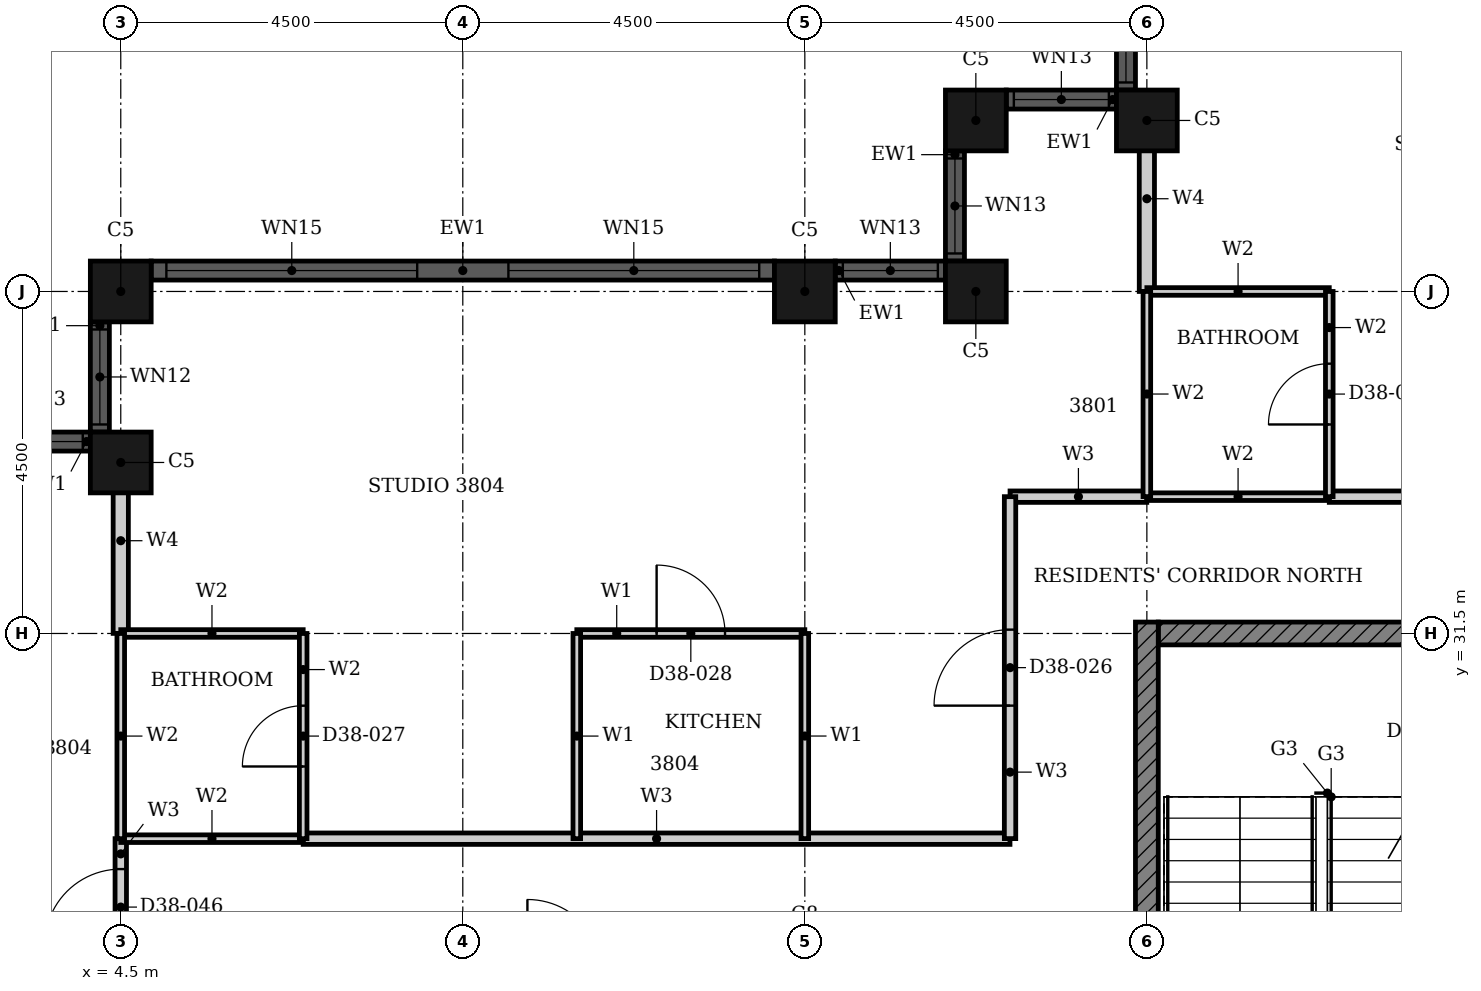
"""IFC4 building model, lengths in metres.
Left out: names, types, materials, properties, quantities, classifications, styles, units other than length and angle.
Written with IfcOpenShell. Run it as: python <this file> out.ifc"""

import sys

from ifc_helpers import new_model, si_unit, direction, frame, frame_2d, origin, origin_2d, place, context, subcontext, project, spatial, rectangle, hollow_rectangle, extrude, element, fill, save


model = new_model("IFC4")
c1 = context("Model", 3, precision=1e-05, world=origin(), true_north=direction((0.0, 1.0)))
c2 = subcontext(c1, "Body", "Model", "MODEL_VIEW")
j1 = project(units=[si_unit("LENGTHUNIT", "METRE"), si_unit("PLANEANGLEUNIT", "RADIAN")], contexts=[c1])
p1 = place(None, origin())
s1 = spatial("IfcSite", under=j1, at=p1, CompositionType="ELEMENT")
p2 = place(p1, origin())
s2 = spatial("IfcBuilding", under=s1, at=p2, CompositionType="ELEMENT")
p3 = place(p2, frame((0.0, 0.0, 154.3)))
s3 = spatial("IfcBuildingStorey", under=s2, at=p3, CompositionType="ELEMENT", Elevation=154.3)
for number, where, z_axis, x_axis in (
    (1, (18.0, 38.25, 0.0), (0.0, 0.0, 1.0), (1.0, 0.0, 0.0)),
    (2, (15.75, 38.25, 0.0), (0.0, 0.0, 1.0), (1.0, 0.0, 0.0)),
    (3, (15.75, 36.0, 0.0), (0.0, 0.0, 1.0), (1.0, 0.0, 0.0)),
    (4, (13.5, 36.0, 0.0), (0.0, 0.0, 1.0), (1.0, 0.0, 0.0)),
    (5, (4.5, 36.0, 0.0), (0.0, 0.0, 1.0), (1.0, 0.0, 0.0)),
    (6, (4.5, 33.75, 0.0), (0.0, 0.0, 1.0), (1.0, 0.0, 0.0)),
):
    element("IfcColumn", number, at=place(p3, frame(where, z_axis=z_axis, x_axis=x_axis)), inside=s3, PredefinedType="COLUMN", context=c2, shape_type="SweptSolid", body=[
        extrude(hollow_rectangle(XDim=0.8, YDim=0.8, WallThickness=0.025, at=origin_2d()), origin(), (0.0, 0.0, 1.0), 3.7),
    ])
p4 = place(p3, frame((17.725, 40.1, 0.0), z_axis=(0.0, 0.0, 1.0), x_axis=(0.0, -1.0, 0.0)))
e7 = element("IfcWall", 7, at=p4, inside=s3, PredefinedType="SOLIDWALL", context=c2, shape_type="SweptSolid", body=[
    extrude(rectangle(XDim=1.45, YDim=0.25, at=frame_2d((0.725, 0.0))), origin(), (0.0, 0.0, 1.0), 3.7),
])
p5 = place(p4, frame((0.1, 0.0, 0.9)))
e8 = element("IfcOpeningElement", 8, at=p5, cuts=e7, PredefinedType="OPENING", context=c2, shape_type="SweptSolid", body=[
    extrude(rectangle(XDim=1.25, YDim=1.85, at=frame_2d((0.625, 0.925))), frame((0.0, 0.135, 0.0), z_axis=(0.0, -1.0, 0.0), x_axis=(1.0, 0.0, 0.0)), (0.0, 0.0, 1.0), 0.27),
])
p6 = place(p3, frame((17.6, 38.525, 0.0), z_axis=(0.0, 0.0, 1.0), x_axis=(-1.0, 0.0, 0.0)))
e9 = element("IfcWall", 9, at=p6, inside=s3, PredefinedType="SOLIDWALL", context=c2, shape_type="SweptSolid", body=[
    extrude(rectangle(XDim=1.45, YDim=0.25, at=frame_2d((0.725, 0.0))), origin(), (0.0, 0.0, 1.0), 3.7),
])
p7 = place(p6, frame((0.1, 0.0, 0.9)))
e10 = element("IfcOpeningElement", 10, at=p7, cuts=e9, PredefinedType="OPENING", context=c2, shape_type="SweptSolid", body=[
    extrude(rectangle(XDim=1.25, YDim=1.85, at=frame_2d((0.625, 0.925))), frame((0.0, 0.135, 0.0), z_axis=(0.0, -1.0, 0.0), x_axis=(1.0, 0.0, 0.0)), (0.0, 0.0, 1.0), 0.27),
])
p8 = place(p3, frame((15.475, 37.85, 0.0), z_axis=(0.0, 0.0, 1.0), x_axis=(0.0, -1.0, 0.0)))
e11 = element("IfcWall", 11, at=p8, inside=s3, PredefinedType="SOLIDWALL", context=c2, shape_type="SweptSolid", body=[
    extrude(rectangle(XDim=1.45, YDim=0.25, at=frame_2d((0.725, 0.0))), origin(), (0.0, 0.0, 1.0), 3.7),
])
p9 = place(p8, frame((0.1, 0.0, 0.9)))
e12 = element("IfcOpeningElement", 12, at=p9, cuts=e11, PredefinedType="OPENING", context=c2, shape_type="SweptSolid", body=[
    extrude(rectangle(XDim=1.25, YDim=1.85, at=frame_2d((0.625, 0.925))), frame((0.0, 0.135, 0.0), z_axis=(0.0, -1.0, 0.0), x_axis=(1.0, 0.0, 0.0)), (0.0, 0.0, 1.0), 0.27),
])
p10 = place(p3, frame((15.35, 36.275, 0.0), z_axis=(0.0, 0.0, 1.0), x_axis=(-1.0, 0.0, 0.0)))
e13 = element("IfcWall", 13, at=p10, inside=s3, PredefinedType="SOLIDWALL", context=c2, shape_type="SweptSolid", body=[
    extrude(rectangle(XDim=1.45, YDim=0.25, at=frame_2d((0.725, 0.0))), origin(), (0.0, 0.0, 1.0), 3.7),
])
p11 = place(p10, frame((0.1, 0.0, 0.9)))
e14 = element("IfcOpeningElement", 14, at=p11, cuts=e13, PredefinedType="OPENING", context=c2, shape_type="SweptSolid", body=[
    extrude(rectangle(XDim=1.25, YDim=1.85, at=frame_2d((0.625, 0.925))), frame((0.0, 0.135, 0.0), z_axis=(0.0, -1.0, 0.0), x_axis=(1.0, 0.0, 0.0)), (0.0, 0.0, 1.0), 0.27),
])
p12 = place(p3, frame((13.1, 36.275, 0.0), z_axis=(0.0, 0.0, 1.0), x_axis=(-1.0, 0.0, 0.0)))
e15 = element("IfcWall", 15, at=p12, inside=s3, PredefinedType="SOLIDWALL", context=c2, shape_type="SweptSolid", body=[
    extrude(rectangle(XDim=8.2, YDim=0.25, at=frame_2d((4.1, 0.0))), origin(), (0.0, 0.0, 1.0), 3.7),
])
p13 = place(p12, frame((0.2, 0.0, 0.45)))
e16 = element("IfcOpeningElement", 16, at=p13, cuts=e15, PredefinedType="OPENING", context=c2, shape_type="SweptSolid", body=[
    extrude(rectangle(XDim=3.3, YDim=2.3, at=frame_2d((1.65, 1.15))), frame((0.0, 0.135, 0.0), z_axis=(0.0, -1.0, 0.0), x_axis=(1.0, 0.0, 0.0)), (0.0, 0.0, 1.0), 0.27),
])
p14 = place(p12, frame((4.7, 0.0, 0.45)))
e17 = element("IfcOpeningElement", 17, at=p14, cuts=e15, PredefinedType="OPENING", context=c2, shape_type="SweptSolid", body=[
    extrude(rectangle(XDim=3.3, YDim=2.3, at=frame_2d((1.65, 1.15))), frame((0.0, 0.135, 0.0), z_axis=(0.0, -1.0, 0.0), x_axis=(1.0, 0.0, 0.0)), (0.0, 0.0, 1.0), 0.27),
])
p15 = place(p3, frame((4.225, 35.6, 0.0), z_axis=(0.0, 0.0, 1.0), x_axis=(0.0, -1.0, 0.0)))
e18 = element("IfcWall", 18, at=p15, inside=s3, PredefinedType="SOLIDWALL", context=c2, shape_type="SweptSolid", body=[
    extrude(rectangle(XDim=1.45, YDim=0.25, at=frame_2d((0.725, 0.0))), origin(), (0.0, 0.0, 1.0), 3.7),
])
p16 = place(p15, frame((0.1, 0.0, 0.9)))
e19 = element("IfcOpeningElement", 19, at=p16, cuts=e18, PredefinedType="OPENING", context=c2, shape_type="SweptSolid", body=[
    extrude(rectangle(XDim=1.25, YDim=2.08, at=frame_2d((0.625, 1.04))), frame((0.0, 0.135, 0.0), z_axis=(0.0, -1.0, 0.0), x_axis=(1.0, 0.0, 0.0)), (0.0, 0.0, 1.0), 0.27),
])
p17 = place(p3, frame((4.1, 34.025, 0.0), z_axis=(0.0, 0.0, 1.0), x_axis=(-1.0, 0.0, 0.0)))
e20 = element("IfcWall", 20, at=p17, inside=s3, PredefinedType="SOLIDWALL", context=c2, shape_type="SweptSolid", body=[
    extrude(rectangle(XDim=1.45, YDim=0.25, at=frame_2d((0.725, 0.0))), origin(), (0.0, 0.0, 1.0), 3.7),
])
p18 = place(p17, frame((0.1, 0.0, 0.9)))
e21 = element("IfcOpeningElement", 21, at=p18, cuts=e20, PredefinedType="OPENING", context=c2, shape_type="SweptSolid", body=[
    extrude(rectangle(XDim=1.25, YDim=1.85, at=frame_2d((0.625, 0.925))), frame((0.0, 0.135, 0.0), z_axis=(0.0, -1.0, 0.0), x_axis=(1.0, 0.0, 0.0)), (0.0, 0.0, 1.0), 0.27),
])
p19 = place(p3, frame((18.15, 31.5, 0.0), z_axis=(0.0, 0.0, 1.0), x_axis=(1.0, 0.0, 0.0)))
e22 = element("IfcWall", 22, at=p19, inside=s3, PredefinedType="SHEAR", context=c2, shape_type="SweptSolid", body=[
    extrude(rectangle(XDim=9.368, YDim=0.3, at=frame_2d((4.684, 0.0))), origin(), (0.0, 0.0, 1.0), 3.4),
])
p20 = place(p19, frame((4.736, 0.0, 0.0)))
e23 = element("IfcOpeningElement", 23, at=p20, cuts=e22, PredefinedType="OPENING", context=c2, shape_type="SweptSolid", body=[
    extrude(rectangle(XDim=1.8, YDim=2.1, at=frame_2d((0.9, 1.05))), frame((0.0, 0.16, 0.0), z_axis=(0.0, -1.0, 0.0), x_axis=(1.0, 0.0, 0.0)), (0.0, 0.0, 1.0), 0.32),
])
p21 = place(p3, frame((18.0, 22.35, 0.0), z_axis=(0.0, 0.0, 1.0), x_axis=(0.0, 1.0, 0.0)))
e24 = element("IfcWall", 24, at=p21, inside=s3, PredefinedType="SHEAR", context=c2, shape_type="SweptSolid", body=[
    extrude(rectangle(XDim=9.3, YDim=0.3, at=frame_2d((4.65, 0.0))), origin(), (0.0, 0.0, 1.0), 3.4),
])
p22 = place(p3, frame((6.9, 28.8, 0.0), z_axis=(0.0, 0.0, 1.0), x_axis=(1.0, 0.0, 0.0)))
e25 = element("IfcWall", 25, at=p22, inside=s3, PredefinedType="PARTITIONING", context=c2, shape_type="SweptSolid", body=[
    extrude(rectangle(XDim=9.299, YDim=0.15, at=frame_2d((4.649, 0.0))), origin(), (0.0, 0.0, 1.0), 3.4),
])
p23 = place(p3, frame((20.4, 33.3, 0.0), z_axis=(0.0, 0.0, 1.0), x_axis=(1.0, 0.0, 0.0)))
e26 = element("IfcWall", 26, at=p23, inside=s3, PredefinedType="PARTITIONING", context=c2, shape_type="SweptSolid", body=[
    extrude(rectangle(XDim=6.6, YDim=0.15, at=frame_2d((3.3, 0.0))), origin(), (0.0, 0.0, 1.0), 3.4),
])
p24 = place(p23, frame((1.3, 0.0, 0.0)))
e27 = element("IfcOpeningElement", 27, at=p24, cuts=e26, PredefinedType="OPENING", context=c2, shape_type="SweptSolid", body=[
    extrude(rectangle(XDim=1.0, YDim=2.2, at=frame_2d((0.5, 1.1))), frame((0.0, 0.085, 0.0), z_axis=(0.0, -1.0, 0.0), x_axis=(1.0, 0.0, 0.0)), (0.0, 0.0, 1.0), 0.17),
])
p25 = place(p3, frame((16.2, 33.3, 0.0), z_axis=(0.0, 0.0, 1.0), x_axis=(1.0, 0.0, 0.0)))
e28 = element("IfcWall", 28, at=p25, inside=s3, PredefinedType="PARTITIONING", context=c2, shape_type="SweptSolid", body=[
    extrude(rectangle(XDim=1.799, YDim=0.15, at=frame_2d((0.899, 0.0))), origin(), (0.0, 0.0, 1.0), 3.4),
])
p26 = place(p3, frame((16.2, 28.801, 0.0), z_axis=(0.0, 0.0, 1.0), x_axis=(0.0, 1.0, 0.0)))
e29 = element("IfcWall", 29, at=p26, inside=s3, PredefinedType="PARTITIONING", context=c2, shape_type="SweptSolid", body=[
    extrude(rectangle(XDim=4.499, YDim=0.15, at=frame_2d((2.25, 0.0))), origin(), (0.0, 0.0, 1.0), 3.4),
])
p27 = place(p26, frame((1.75, 0.0, 0.0)))
e30 = element("IfcOpeningElement", 30, at=p27, cuts=e29, PredefinedType="OPENING", context=c2, shape_type="SweptSolid", body=[
    extrude(rectangle(XDim=1.0, YDim=2.2, at=frame_2d((0.5, 1.1))), frame((0.0, 0.085, 0.0), z_axis=(0.0, -1.0, 0.0), x_axis=(1.0, 0.0, 0.0)), (0.0, 0.0, 1.0), 0.17),
])
p28 = place(p3, frame((4.5, 27.0, 0.0), z_axis=(0.0, 0.0, 1.0), x_axis=(0.0, 1.0, 0.0)))
e31 = element("IfcWall", 31, at=p28, inside=s3, PredefinedType="PARTITIONING", context=c2, shape_type="SweptSolid", body=[
    extrude(rectangle(XDim=1.8, YDim=0.15, at=frame_2d((0.9, 0.0))), origin(), (0.0, 0.0, 1.0), 3.4),
])
p29 = place(p28, frame((0.4, 0.0, 0.0)))
e32 = element("IfcOpeningElement", 32, at=p29, cuts=e31, PredefinedType="OPENING", context=c2, shape_type="SweptSolid", body=[
    extrude(rectangle(XDim=1.0, YDim=2.2, at=frame_2d((0.5, 1.1))), frame((0.0, 0.085, 0.0), z_axis=(0.0, -1.0, 0.0), x_axis=(1.0, 0.0, 0.0)), (0.0, 0.0, 1.0), 0.17),
])
p30 = place(p3, frame((10.5, 31.5, 0.0), z_axis=(0.0, 0.0, 1.0), x_axis=(1.0, 0.0, 0.0)))
e33 = element("IfcWall", 33, at=p30, inside=s3, PredefinedType="PARTITIONING", context=c2, shape_type="SweptSolid", body=[
    extrude(rectangle(XDim=3.0, YDim=0.1, at=frame_2d((1.5, 0.0))), origin(), (0.0, 0.0, 1.0), 2.68),
])
p31 = place(p30, frame((1.05, 0.0, 0.0)))
e34 = element("IfcOpeningElement", 34, at=p31, cuts=e33, PredefinedType="OPENING", context=c2, shape_type="SweptSolid", body=[
    extrude(rectangle(XDim=0.9, YDim=2.1, at=frame_2d((0.45, 1.05))), frame((0.0, 0.06, 0.0), z_axis=(0.0, -1.0, 0.0), x_axis=(1.0, 0.0, 0.0)), (0.0, 0.0, 1.0), 0.12),
])
p32 = place(p3, frame((10.5, 28.8, 0.0), z_axis=(0.0, 0.0, 1.0), x_axis=(0.0, 1.0, 0.0)))
e35 = element("IfcWall", 35, at=p32, inside=s3, PredefinedType="PARTITIONING", context=c2, shape_type="SweptSolid", body=[
    extrude(rectangle(XDim=2.7, YDim=0.1, at=frame_2d((1.35, 0.0))), origin(), (0.0, 0.0, 1.0), 3.4),
])
p33 = place(p3, frame((13.5, 28.801, 0.0), z_axis=(0.0, 0.0, 1.0), x_axis=(0.0, 1.0, 0.0)))
e36 = element("IfcWall", 36, at=p33, inside=s3, PredefinedType="PARTITIONING", context=c2, shape_type="SweptSolid", body=[
    extrude(rectangle(XDim=2.699, YDim=0.1, at=frame_2d((1.35, 0.0))), origin(), (0.0, 0.0, 1.0), 2.48),
])
p34 = place(p3, frame((18.0, 36.0, 0.0), z_axis=(0.0, 0.0, 1.0), x_axis=(0.0, 1.0, 0.0)))
e37 = element("IfcWall", 37, at=p34, inside=s3, PredefinedType="PARTITIONING", context=c2, shape_type="SweptSolid", body=[
    extrude(rectangle(XDim=2.44, YDim=0.2, at=frame_2d((1.22, 0.0))), origin(), (0.0, 0.0, 1.0), 3.4),
])
p35 = place(p3, frame((4.5, 31.501, 0.0), z_axis=(0.0, 0.0, 1.0), x_axis=(0.0, 1.0, 0.0)))
e38 = element("IfcWall", 38, at=p35, inside=s3, PredefinedType="PARTITIONING", context=c2, shape_type="SweptSolid", body=[
    extrude(rectangle(XDim=2.439, YDim=0.2, at=frame_2d((1.219, 0.0))), origin(), (0.0, 0.0, 1.0), 3.4),
])
p36 = place(p3, frame((4.5, 28.8, 0.0), z_axis=(0.0, 0.0, 1.0), x_axis=(1.0, 0.0, 0.0)))
e39 = element("IfcWall", 39, at=p36, inside=s3, PredefinedType="PARTITIONING", context=c2, shape_type="SweptSolid", body=[
    extrude(rectangle(XDim=2.4, YDim=0.1, at=frame_2d((1.2, 0.0))), origin(), (0.0, 0.0, 1.0), 3.4),
])
p37 = place(p3, frame((4.5, 31.5, 0.0), z_axis=(0.0, 0.0, 1.0), x_axis=(1.0, 0.0, 0.0)))
e40 = element("IfcWall", 40, at=p37, inside=s3, PredefinedType="PARTITIONING", context=c2, shape_type="SweptSolid", body=[
    extrude(rectangle(XDim=2.4, YDim=0.1, at=frame_2d((1.2, 0.0))), origin(), (0.0, 0.0, 1.0), 2.68),
])
for number, where, z_axis, x_axis in (
    (41, (18.0, 33.3, 0.0), (0.0, 0.0, 1.0), (1.0, 0.0, 0.0)),
    (42, (18.0, 36.0, 0.0), (0.0, 0.0, 1.0), (1.0, 0.0, 0.0)),
):
    element("IfcWall", number, at=place(p3, frame(where, z_axis=z_axis, x_axis=x_axis)), inside=s3, PredefinedType="PARTITIONING", context=c2, shape_type="SweptSolid", body=[
        extrude(rectangle(XDim=2.4, YDim=0.1, at=frame_2d((1.2, 0.0))), origin(), (0.0, 0.0, 1.0), 3.4),
    ])
p38 = place(p3, frame((18.0, 33.301, 0.0), z_axis=(0.0, 0.0, 1.0), x_axis=(0.0, 1.0, 0.0)))
e43 = element("IfcWall", 43, at=p38, inside=s3, PredefinedType="PARTITIONING", context=c2, shape_type="SweptSolid", body=[
    extrude(rectangle(XDim=2.699, YDim=0.1, at=frame_2d((1.35, 0.0))), origin(), (0.0, 0.0, 1.0), 3.4),
])
p39 = place(p3, frame((20.4, 33.3, 0.0), z_axis=(0.0, 0.0, 1.0), x_axis=(0.0, 1.0, 0.0)))
e44 = element("IfcWall", 44, at=p39, inside=s3, PredefinedType="PARTITIONING", context=c2, shape_type="SweptSolid", body=[
    extrude(rectangle(XDim=2.7, YDim=0.1, at=frame_2d((1.35, 0.0))), origin(), (0.0, 0.0, 1.0), 3.4),
])
p40 = place(p39, frame((0.95, 0.0, 0.0)))
e45 = element("IfcOpeningElement", 45, at=p40, cuts=e44, PredefinedType="OPENING", context=c2, shape_type="SweptSolid", body=[
    extrude(rectangle(XDim=0.8, YDim=2.1, at=frame_2d((0.4, 1.05))), frame((0.0, 0.06, 0.0), z_axis=(0.0, -1.0, 0.0), x_axis=(1.0, 0.0, 0.0)), (0.0, 0.0, 1.0), 0.12),
])
p41 = place(p3, frame((4.5, 28.8, 0.0), z_axis=(0.0, 0.0, 1.0), x_axis=(0.0, 1.0, 0.0)))
e46 = element("IfcWall", 46, at=p41, inside=s3, PredefinedType="PARTITIONING", context=c2, shape_type="SweptSolid", body=[
    extrude(rectangle(XDim=2.7, YDim=0.1, at=frame_2d((1.35, 0.0))), origin(), (0.0, 0.0, 1.0), 3.4),
])
p42 = place(p3, frame((6.9, 28.8, 0.0), z_axis=(0.0, 0.0, 1.0), x_axis=(0.0, 1.0, 0.0)))
e47 = element("IfcWall", 47, at=p42, inside=s3, PredefinedType="PARTITIONING", context=c2, shape_type="SweptSolid", body=[
    extrude(rectangle(XDim=2.7, YDim=0.1, at=frame_2d((1.35, 0.0))), origin(), (0.0, 0.0, 1.0), 3.4),
])
p43 = place(p42, frame((0.95, 0.0, 0.0)))
e48 = element("IfcOpeningElement", 48, at=p43, cuts=e47, PredefinedType="OPENING", context=c2, shape_type="SweptSolid", body=[
    extrude(rectangle(XDim=0.8, YDim=2.1, at=frame_2d((0.4, 1.05))), frame((0.0, 0.06, 0.0), z_axis=(0.0, -1.0, 0.0), x_axis=(1.0, 0.0, 0.0)), (0.0, 0.0, 1.0), 0.12),
])
p44 = place(p5, origin())
e49 = element("IfcWindow", 49, at=p44, inside=s3, PartitioningType="SINGLE_PANEL", PredefinedType="WINDOW", context=c2, shape_type="SweptSolid", body=[
    extrude(rectangle(XDim=1.25, YDim=1.85, at=frame_2d((0.625, 0.925))), frame((0.0, 0.03, 0.0), z_axis=(0.0, -1.0, 0.0), x_axis=(1.0, 0.0, 0.0)), (0.0, 0.0, 1.0), 0.06),
])
fill(e8, e49)
p45 = place(p7, origin())
e50 = element("IfcWindow", 50, at=p45, inside=s3, PartitioningType="SINGLE_PANEL", PredefinedType="WINDOW", context=c2, shape_type="SweptSolid", body=[
    extrude(rectangle(XDim=1.25, YDim=1.85, at=frame_2d((0.625, 0.925))), frame((0.0, 0.03, 0.0), z_axis=(0.0, -1.0, 0.0), x_axis=(1.0, 0.0, 0.0)), (0.0, 0.0, 1.0), 0.06),
])
fill(e10, e50)
p46 = place(p9, origin())
e51 = element("IfcWindow", 51, at=p46, inside=s3, PartitioningType="SINGLE_PANEL", PredefinedType="WINDOW", context=c2, shape_type="SweptSolid", body=[
    extrude(rectangle(XDim=1.25, YDim=1.85, at=frame_2d((0.625, 0.925))), frame((0.0, 0.03, 0.0), z_axis=(0.0, -1.0, 0.0), x_axis=(1.0, 0.0, 0.0)), (0.0, 0.0, 1.0), 0.06),
])
fill(e12, e51)
p47 = place(p11, origin())
e52 = element("IfcWindow", 52, at=p47, inside=s3, PartitioningType="SINGLE_PANEL", PredefinedType="WINDOW", context=c2, shape_type="SweptSolid", body=[
    extrude(rectangle(XDim=1.25, YDim=1.85, at=frame_2d((0.625, 0.925))), frame((0.0, 0.03, 0.0), z_axis=(0.0, -1.0, 0.0), x_axis=(1.0, 0.0, 0.0)), (0.0, 0.0, 1.0), 0.06),
])
fill(e14, e52)
p48 = place(p13, origin())
e53 = element("IfcWindow", 53, at=p48, inside=s3, PartitioningType="SINGLE_PANEL", PredefinedType="WINDOW", context=c2, shape_type="SweptSolid", body=[
    extrude(rectangle(XDim=3.3, YDim=2.3, at=frame_2d((1.65, 1.15))), frame((0.0, 0.03, 0.0), z_axis=(0.0, -1.0, 0.0), x_axis=(1.0, 0.0, 0.0)), (0.0, 0.0, 1.0), 0.06),
])
fill(e16, e53)
p49 = place(p14, origin())
e54 = element("IfcWindow", 54, at=p49, inside=s3, PartitioningType="SINGLE_PANEL", PredefinedType="WINDOW", context=c2, shape_type="SweptSolid", body=[
    extrude(rectangle(XDim=3.3, YDim=2.3, at=frame_2d((1.65, 1.15))), frame((0.0, 0.03, 0.0), z_axis=(0.0, -1.0, 0.0), x_axis=(1.0, 0.0, 0.0)), (0.0, 0.0, 1.0), 0.06),
])
fill(e17, e54)
p50 = place(p16, origin())
e55 = element("IfcWindow", 55, at=p50, inside=s3, PartitioningType="SINGLE_PANEL", PredefinedType="WINDOW", context=c2, shape_type="SweptSolid", body=[
    extrude(rectangle(XDim=1.25, YDim=2.08, at=frame_2d((0.625, 1.04))), frame((0.0, 0.03, 0.0), z_axis=(0.0, -1.0, 0.0), x_axis=(1.0, 0.0, 0.0)), (0.0, 0.0, 1.0), 0.06),
])
fill(e19, e55)
p51 = place(p18, origin())
e56 = element("IfcWindow", 56, at=p51, inside=s3, PartitioningType="SINGLE_PANEL", PredefinedType="WINDOW", context=c2, shape_type="SweptSolid", body=[
    extrude(rectangle(XDim=1.25, YDim=1.85, at=frame_2d((0.625, 0.925))), frame((0.0, 0.03, 0.0), z_axis=(0.0, -1.0, 0.0), x_axis=(1.0, 0.0, 0.0)), (0.0, 0.0, 1.0), 0.06),
])
fill(e21, e56)
p52 = place(p40, origin())
e57 = element("IfcDoor", 57, at=p52, inside=s3, OperationType="SINGLE_SWING_LEFT", PredefinedType="DOOR", context=c2, shape_type="SweptSolid", body=[
    extrude(rectangle(XDim=0.8, YDim=2.1, at=frame_2d((0.4, 1.05))), frame((0.0, 0.025, 0.0), z_axis=(0.0, -1.0, 0.0), x_axis=(1.0, 0.0, 0.0)), (0.0, 0.0, 1.0), 0.05),
])
fill(e45, e57)
p53 = place(p27, origin())
e58 = element("IfcDoor", 58, at=p53, inside=s3, OperationType="SINGLE_SWING_LEFT", PredefinedType="DOOR", context=c2, shape_type="SweptSolid", body=[
    extrude(rectangle(XDim=1.0, YDim=2.2, at=frame_2d((0.5, 1.1))), frame((0.0, 0.025, 0.0), z_axis=(0.0, -1.0, 0.0), x_axis=(1.0, 0.0, 0.0)), (0.0, 0.0, 1.0), 0.05),
])
fill(e30, e58)
p54 = place(p43, origin())
e59 = element("IfcDoor", 59, at=p54, inside=s3, OperationType="SINGLE_SWING_LEFT", PredefinedType="DOOR", context=c2, shape_type="SweptSolid", body=[
    extrude(rectangle(XDim=0.8, YDim=2.1, at=frame_2d((0.4, 1.05))), frame((0.0, 0.025, 0.0), z_axis=(0.0, -1.0, 0.0), x_axis=(1.0, 0.0, 0.0)), (0.0, 0.0, 1.0), 0.05),
])
fill(e48, e59)
p55 = place(p31, origin())
e60 = element("IfcDoor", 60, at=p55, inside=s3, OperationType="SINGLE_SWING_RIGHT", PredefinedType="DOOR", context=c2, shape_type="SweptSolid", body=[
    extrude(rectangle(XDim=0.9, YDim=2.1, at=frame_2d((0.45, 1.05))), frame((0.0, 0.025, 0.0), z_axis=(0.0, -1.0, 0.0), x_axis=(1.0, 0.0, 0.0)), (0.0, 0.0, 1.0), 0.05),
])
fill(e34, e60)
p56 = place(p29, origin())
e61 = element("IfcDoor", 61, at=p56, inside=s3, OperationType="SINGLE_SWING_LEFT", PredefinedType="DOOR", context=c2, shape_type="SweptSolid", body=[
    extrude(rectangle(XDim=1.0, YDim=2.2, at=frame_2d((0.5, 1.1))), frame((0.0, 0.025, 0.0), z_axis=(0.0, -1.0, 0.0), x_axis=(1.0, 0.0, 0.0)), (0.0, 0.0, 1.0), 0.05),
])
fill(e32, e61)
save(model, sys.argv[1])
